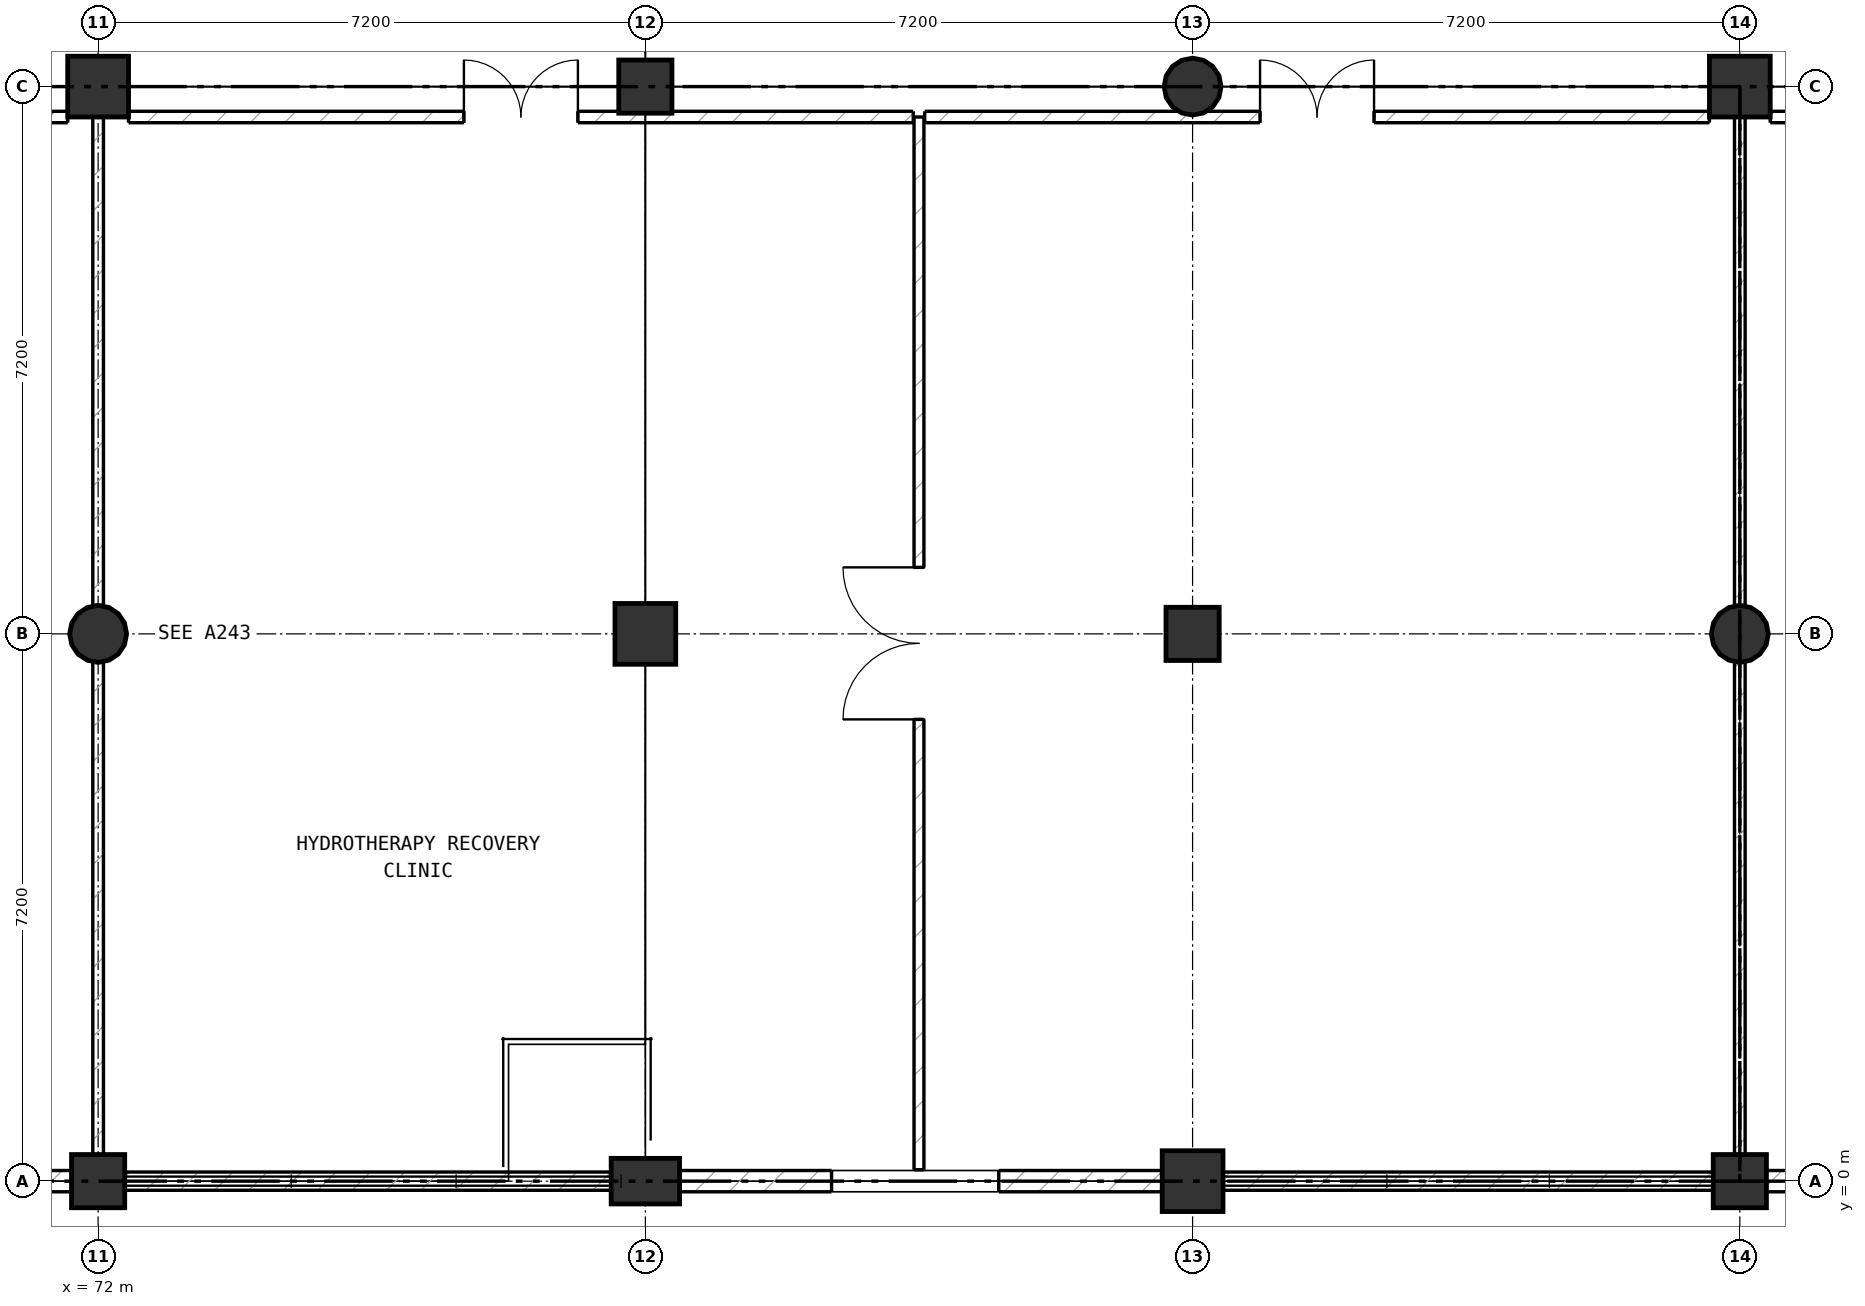
"""IFC4 building model, lengths in metres.
Left out: names, types, materials, properties, quantities, classifications, styles, units other than length and angle.
Written with IfcOpenShell. Run it as: python <this file> out.ifc"""

import sys

from ifc_helpers import new_model, si_unit, direction, frame, frame_2d, origin, origin_2d, place, context, subcontext, project, spatial, rectangle, circle, extrude, element, fill, save


model = new_model("IFC4")
c1 = context("Model", 3, precision=1e-05, world=origin(), true_north=direction((0.0, 1.0)))
c2 = subcontext(c1, "Body", "Model", "MODEL_VIEW")
j1 = project(units=[si_unit("LENGTHUNIT", "METRE"), si_unit("PLANEANGLEUNIT", "RADIAN")], contexts=[c1])
p1 = place(None, origin())
s1 = spatial("IfcSite", under=j1, at=p1, CompositionType="ELEMENT")
p2 = place(p1, origin())
s2 = spatial("IfcBuilding", under=s1, at=p2, CompositionType="ELEMENT")
p3 = place(p2, frame((0.0, 0.0, 5.6)))
s3 = spatial("IfcBuildingStorey", under=s2, at=p3, CompositionType="ELEMENT", Elevation=5.6)
p4 = place(p3, frame((72.0, 0.0, 0.0), z_axis=(0.0, 0.0, 1.0), x_axis=(1.0, 0.0, 0.0)))
e1 = element("IfcColumn", 1, at=p4, inside=s3, PredefinedType="COLUMN", context=c2, shape_type="SweptSolid", body=[
    extrude(rectangle(XDim=0.7, YDim=0.7, at=origin_2d()), origin(), (0.0, 0.0, 1.0), 5.6),
])
p5 = place(p3, frame((72.0, 7.2, 0.0), z_axis=(0.0, 0.0, 1.0), x_axis=(1.0, 0.0, 0.0)))
e2 = element("IfcColumn", 2, at=p5, inside=s3, PredefinedType="COLUMN", context=c2, shape_type="SweptSolid", body=[
    extrude(circle(Radius=0.375, at=origin_2d()), origin(), (0.0, 0.0, 1.0), 5.6),
])
p6 = place(p3, frame((72.0, 14.4, 0.0), z_axis=(0.0, 0.0, 1.0), x_axis=(1.0, 0.0, 0.0)))
e3 = element("IfcColumn", 3, at=p6, inside=s3, PredefinedType="COLUMN", context=c2, shape_type="SweptSolid", body=[
    extrude(rectangle(XDim=0.8, YDim=0.8, at=origin_2d()), origin(), (0.0, 0.0, 1.0), 5.6),
])
p7 = place(p3, frame((79.2, 0.0, 0.0), z_axis=(0.0, 0.0, 1.0), x_axis=(1.0, 0.0, 0.0)))
e4 = element("IfcColumn", 4, at=p7, inside=s3, PredefinedType="COLUMN", context=c2, shape_type="SweptSolid", body=[
    extrude(rectangle(XDim=0.6, YDim=0.9, at=origin_2d()), origin(), (0.0, 0.0, 1.0), 5.6),
])
p8 = place(p3, frame((79.2, 7.2, 0.0), z_axis=(0.0, 0.0, 1.0), x_axis=(1.0, 0.0, 0.0)))
e5 = element("IfcColumn", 5, at=p8, inside=s3, PredefinedType="COLUMN", context=c2, shape_type="SweptSolid", body=[
    extrude(rectangle(XDim=0.8, YDim=0.8, at=origin_2d()), origin(), (0.0, 0.0, 1.0), 5.6),
])
p9 = place(p3, frame((79.2, 14.4, 0.0), z_axis=(0.0, 0.0, 1.0), x_axis=(1.0, 0.0, 0.0)))
e6 = element("IfcColumn", 6, at=p9, inside=s3, PredefinedType="COLUMN", context=c2, shape_type="SweptSolid", body=[
    extrude(rectangle(XDim=0.7, YDim=0.7, at=origin_2d()), origin(), (0.0, 0.0, 1.0), 5.6),
])
p10 = place(p3, frame((86.4, 0.0, 0.0), z_axis=(0.0, 0.0, 1.0), x_axis=(1.0, 0.0, 0.0)))
e7 = element("IfcColumn", 7, at=p10, inside=s3, PredefinedType="COLUMN", context=c2, shape_type="SweptSolid", body=[
    extrude(rectangle(XDim=0.8, YDim=0.8, at=origin_2d()), origin(), (0.0, 0.0, 1.0), 5.6),
])
p11 = place(p3, frame((86.4, 7.2, 0.0), z_axis=(0.0, 0.0, 1.0), x_axis=(1.0, 0.0, 0.0)))
e8 = element("IfcColumn", 8, at=p11, inside=s3, PredefinedType="COLUMN", context=c2, shape_type="SweptSolid", body=[
    extrude(rectangle(XDim=0.7, YDim=0.7, at=origin_2d()), origin(), (0.0, 0.0, 1.0), 5.6),
])
p12 = place(p3, frame((86.4, 14.4, 0.0), z_axis=(0.0, 0.0, 1.0), x_axis=(1.0, 0.0, 0.0)))
e9 = element("IfcColumn", 9, at=p12, inside=s3, PredefinedType="COLUMN", context=c2, shape_type="SweptSolid", body=[
    extrude(circle(Radius=0.375, at=origin_2d()), origin(), (0.0, 0.0, 1.0), 5.6),
])
p13 = place(p3, frame((93.6, 0.0, 0.0), z_axis=(0.0, 0.0, 1.0), x_axis=(1.0, 0.0, 0.0)))
e10 = element("IfcColumn", 10, at=p13, inside=s3, PredefinedType="COLUMN", context=c2, shape_type="SweptSolid", body=[
    extrude(rectangle(XDim=0.7, YDim=0.7, at=origin_2d()), origin(), (0.0, 0.0, 1.0), 5.6),
])
p14 = place(p3, frame((93.6, 7.2, 0.0), z_axis=(0.0, 0.0, 1.0), x_axis=(1.0, 0.0, 0.0)))
e11 = element("IfcColumn", 11, at=p14, inside=s3, PredefinedType="COLUMN", context=c2, shape_type="SweptSolid", body=[
    extrude(circle(Radius=0.375, at=origin_2d()), origin(), (0.0, 0.0, 1.0), 5.6),
])
p15 = place(p3, frame((93.6, 14.4, 0.0), z_axis=(0.0, 0.0, 1.0), x_axis=(1.0, 0.0, 0.0)))
e12 = element("IfcColumn", 12, at=p15, inside=s3, PredefinedType="COLUMN", context=c2, shape_type="SweptSolid", body=[
    extrude(rectangle(XDim=0.8, YDim=0.8, at=origin_2d()), origin(), (0.0, 0.0, 1.0), 5.6),
])
p16 = place(p3, frame((100.515, 0.0, 0.0), z_axis=(0.0, 0.0, 1.0), x_axis=(-1.0, 0.0, 0.0)))
e13 = element("IfcWall", 13, at=p16, inside=s3, PredefinedType="SOLIDWALL", context=c2, shape_type="SweptSolid", body=[
    extrude(rectangle(XDim=6.58, YDim=0.28, at=frame_2d((3.29, 0.0))), origin(), (0.0, 0.0, 1.0), 4.985),
])
p17 = place(p16, frame((2.19, 0.0, 1.0)))
e14 = element("IfcOpeningElement", 14, at=p17, cuts=e13, PredefinedType="OPENING", context=c2, shape_type="SweptSolid", body=[
    extrude(rectangle(XDim=2.2, YDim=1.8, at=frame_2d((1.1, 0.9))), frame((0.0, 0.15, 0.0), z_axis=(0.0, -1.0, 0.0), x_axis=(1.0, 0.0, 0.0)), (0.0, 0.0, 1.0), 0.3),
])
p18 = place(p3, frame((93.265, 0.0, 0.0), z_axis=(0.0, 0.0, 1.0), x_axis=(-1.0, 0.0, 0.0)))
e15 = element("IfcWall", 15, at=p18, inside=s3, PredefinedType="SOLIDWALL", context=c2, shape_type="SweptSolid", body=[
    extrude(rectangle(XDim=6.48, YDim=0.24, at=frame_2d((3.24, 0.0))), origin(), (0.0, 0.0, 1.0), 0.35),
])
p19 = place(p3, frame((86.015, 0.0, 0.0), z_axis=(0.0, 0.0, 1.0), x_axis=(-1.0, 0.0, 0.0)))
e16 = element("IfcWall", 16, at=p19, inside=s3, PredefinedType="SOLIDWALL", context=c2, shape_type="SweptSolid", body=[
    extrude(rectangle(XDim=6.53, YDim=0.28, at=frame_2d((3.265, 0.0))), origin(), (0.0, 0.0, 1.0), 4.985),
])
p20 = place(p19, frame((2.165, 0.0, 1.0)))
e17 = element("IfcOpeningElement", 17, at=p20, cuts=e16, PredefinedType="OPENING", context=c2, shape_type="SweptSolid", body=[
    extrude(rectangle(XDim=2.2, YDim=1.8, at=frame_2d((1.1, 0.9))), frame((0.0, 0.15, 0.0), z_axis=(0.0, -1.0, 0.0), x_axis=(1.0, 0.0, 0.0)), (0.0, 0.0, 1.0), 0.3),
])
p21 = place(p3, frame((78.915, 0.0, 0.0), z_axis=(0.0, 0.0, 1.0), x_axis=(-1.0, 0.0, 0.0)))
e18 = element("IfcWall", 18, at=p21, inside=s3, PredefinedType="SOLIDWALL", context=c2, shape_type="SweptSolid", body=[
    extrude(rectangle(XDim=6.58, YDim=0.24, at=frame_2d((3.29, 0.0))), origin(), (0.0, 0.0, 1.0), 0.35),
])
p22 = place(p3, frame((71.665, 0.0, 0.0), z_axis=(0.0, 0.0, 1.0), x_axis=(-1.0, 0.0, 0.0)))
e19 = element("IfcWall", 19, at=p22, inside=s3, PredefinedType="SOLIDWALL", context=c2, shape_type="SweptSolid", body=[
    extrude(rectangle(XDim=6.48, YDim=0.28, at=frame_2d((3.24, 0.0))), origin(), (0.0, 0.0, 1.0), 4.985),
])
p23 = place(p22, frame((2.34, 0.0, 1.0)))
e20 = element("IfcOpeningElement", 20, at=p23, cuts=e19, PredefinedType="OPENING", context=c2, shape_type="SweptSolid", body=[
    extrude(rectangle(XDim=1.8, YDim=1.8, at=frame_2d((0.9, 0.9))), frame((0.0, 0.15, 0.0), z_axis=(0.0, -1.0, 0.0), x_axis=(1.0, 0.0, 0.0)), (0.0, 0.0, 1.0), 0.3),
])
p24 = place(p3, frame((72.0, 0.35, 0.0), z_axis=(0.0, 0.0, 1.0), x_axis=(0.0, 1.0, 0.0)))
e21 = element("IfcWall", 21, at=p24, inside=s3, PredefinedType="PARTITIONING", context=c2, shape_type="SweptSolid", body=[
    extrude(rectangle(XDim=6.475, YDim=0.14, at=frame_2d((3.237, 0.0))), origin(), (0.0, 0.0, 1.0), 4.88),
])
p25 = place(p3, frame((72.0, 7.575, 0.0), z_axis=(0.0, 0.0, 1.0), x_axis=(0.0, 1.0, 0.0)))
e22 = element("IfcWall", 22, at=p25, inside=s3, PredefinedType="PARTITIONING", context=c2, shape_type="SweptSolid", body=[
    extrude(rectangle(XDim=6.425, YDim=0.14, at=frame_2d((3.212, 0.0))), origin(), (0.0, 0.0, 1.0), 4.88),
])
p26 = place(p3, frame((93.6, 0.35, 0.0), z_axis=(0.0, 0.0, 1.0), x_axis=(0.0, 1.0, 0.0)))
e23 = element("IfcWall", 23, at=p26, inside=s3, PredefinedType="PARTITIONING", context=c2, shape_type="SweptSolid", body=[
    extrude(rectangle(XDim=6.475, YDim=0.14, at=frame_2d((3.237, 0.0))), origin(), (0.0, 0.0, 1.0), 4.88),
])
p27 = place(p3, frame((93.6, 7.575, 0.0), z_axis=(0.0, 0.0, 1.0), x_axis=(0.0, 1.0, 0.0)))
e24 = element("IfcWall", 24, at=p27, inside=s3, PredefinedType="PARTITIONING", context=c2, shape_type="SweptSolid", body=[
    extrude(rectangle(XDim=6.425, YDim=0.14, at=frame_2d((3.212, 0.0))), origin(), (0.0, 0.0, 1.0), 4.88),
])
p28 = place(p3, frame((82.8, 0.15, 0.0), z_axis=(0.0, 0.0, 1.0), x_axis=(0.0, 1.0, 0.0)))
e25 = element("IfcWall", 25, at=p28, inside=s3, PredefinedType="PARTITIONING", context=c2, shape_type="SweptSolid", body=[
    extrude(rectangle(XDim=13.85, YDim=0.13, at=frame_2d((6.925, 0.0))), origin(), (0.0, 0.0, 1.0), 5.31),
])
p29 = place(p28, frame((5.925, 0.0, 0.0)))
e26 = element("IfcOpeningElement", 26, at=p29, cuts=e25, PredefinedType="OPENING", context=c2, shape_type="SweptSolid", body=[
    extrude(rectangle(XDim=2.0, YDim=2.3, at=frame_2d((1.0, 1.15))), frame((0.0, 0.075, 0.0), z_axis=(0.0, -1.0, 0.0), x_axis=(1.0, 0.0, 0.0)), (0.0, 0.0, 1.0), 0.15),
])
p30 = place(p3, frame((64.86, 14.0, 0.0), z_axis=(0.0, 0.0, 1.0), x_axis=(1.0, 0.0, 0.0)))
e27 = element("IfcWall", 27, at=p30, inside=s3, PredefinedType="PARTITIONING", context=c2, shape_type="SweptSolid", body=[
    extrude(rectangle(XDim=6.74, YDim=0.15, at=frame_2d((3.37, 0.0))), origin(), (0.0, 0.0, 1.0), 5.31),
])
p31 = place(p30, frame((2.845, 0.0, 0.0)))
e28 = element("IfcOpeningElement", 28, at=p31, cuts=e27, PredefinedType="OPENING", context=c2, shape_type="SweptSolid", body=[
    extrude(rectangle(XDim=1.05, YDim=2.15, at=frame_2d((0.525, 1.075))), frame((0.0, 0.085, 0.0), z_axis=(0.0, -1.0, 0.0), x_axis=(1.0, 0.0, 0.0)), (0.0, 0.0, 1.0), 0.17),
])
p32 = place(p3, frame((72.4, 14.0, 0.0), z_axis=(0.0, 0.0, 1.0), x_axis=(1.0, 0.0, 0.0)))
e29 = element("IfcWall", 29, at=p32, inside=s3, PredefinedType="PARTITIONING", context=c2, shape_type="SweptSolid", body=[
    extrude(rectangle(XDim=10.325, YDim=0.15, at=frame_2d((5.163, 0.0))), origin(), (0.0, 0.0, 1.0), 5.31),
])
p33 = place(p32, frame((4.413, 0.0, 0.0)))
e30 = element("IfcOpeningElement", 30, at=p33, cuts=e29, PredefinedType="OPENING", context=c2, shape_type="SweptSolid", body=[
    extrude(rectangle(XDim=1.5, YDim=2.2, at=frame_2d((0.75, 1.1))), frame((0.0, 0.085, 0.0), z_axis=(0.0, -1.0, 0.0), x_axis=(1.0, 0.0, 0.0)), (0.0, 0.0, 1.0), 0.17),
])
p34 = place(p3, frame((82.875, 14.0, 0.0), z_axis=(0.0, 0.0, 1.0), x_axis=(1.0, 0.0, 0.0)))
e31 = element("IfcWall", 31, at=p34, inside=s3, PredefinedType="PARTITIONING", context=c2, shape_type="SweptSolid", body=[
    extrude(rectangle(XDim=10.325, YDim=0.15, at=frame_2d((5.163, 0.0))), origin(), (0.0, 0.0, 1.0), 5.31),
])
p35 = place(p34, frame((4.413, 0.0, 0.0)))
e32 = element("IfcOpeningElement", 32, at=p35, cuts=e31, PredefinedType="OPENING", context=c2, shape_type="SweptSolid", body=[
    extrude(rectangle(XDim=1.5, YDim=2.2, at=frame_2d((0.75, 1.1))), frame((0.0, 0.085, 0.0), z_axis=(0.0, -1.0, 0.0), x_axis=(1.0, 0.0, 0.0)), (0.0, 0.0, 1.0), 0.17),
])
p36 = place(p3, frame((94.0, 14.0, 0.0), z_axis=(0.0, 0.0, 1.0), x_axis=(1.0, 0.0, 0.0)))
e33 = element("IfcWall", 33, at=p36, inside=s3, PredefinedType="PARTITIONING", context=c2, shape_type="SweptSolid", body=[
    extrude(rectangle(XDim=6.72, YDim=0.15, at=frame_2d((3.36, 0.0))), origin(), (0.0, 0.0, 1.0), 5.31),
])
p37 = place(p36, frame((2.835, 0.0, 0.0)))
e34 = element("IfcOpeningElement", 34, at=p37, cuts=e33, PredefinedType="OPENING", context=c2, shape_type="SweptSolid", body=[
    extrude(rectangle(XDim=1.05, YDim=2.15, at=frame_2d((0.525, 1.075))), frame((0.0, 0.085, 0.0), z_axis=(0.0, -1.0, 0.0), x_axis=(1.0, 0.0, 0.0)), (0.0, 0.0, 1.0), 0.17),
])
p38 = place(p20, origin())
e35 = element("IfcWindow", 35, at=p38, inside=s3, PartitioningType="SINGLE_PANEL", PredefinedType="WINDOW", context=c2, shape_type="SweptSolid", body=[
    extrude(rectangle(XDim=2.2, YDim=1.8, at=frame_2d((1.1, 0.9))), frame((0.0, 0.03, 0.0), z_axis=(0.0, -1.0, 0.0), x_axis=(1.0, 0.0, 0.0)), (0.0, 0.0, 1.0), 0.06),
])
fill(e17, e35)
p39 = place(p29, origin())
e36 = element("IfcDoor", 36, at=p39, inside=s3, OperationType="DOUBLE_DOOR_SINGLE_SWING", PredefinedType="DOOR", context=c2, shape_type="SweptSolid", body=[
    extrude(rectangle(XDim=2.0, YDim=2.3, at=frame_2d((1.0, 1.15))), frame((0.0, 0.025, 0.0), z_axis=(0.0, -1.0, 0.0), x_axis=(1.0, 0.0, 0.0)), (0.0, 0.0, 1.0), 0.05),
])
fill(e26, e36)
p40 = place(p33, origin())
e37 = element("IfcDoor", 37, at=p40, inside=s3, OperationType="DOUBLE_DOOR_SINGLE_SWING", PredefinedType="DOOR", context=c2, shape_type="SweptSolid", body=[
    extrude(rectangle(XDim=1.5, YDim=2.2, at=frame_2d((0.75, 1.1))), frame((0.0, 0.025, 0.0), z_axis=(0.0, -1.0, 0.0), x_axis=(1.0, 0.0, 0.0)), (0.0, 0.0, 1.0), 0.05),
])
fill(e30, e37)
p41 = place(p35, origin())
e38 = element("IfcDoor", 38, at=p41, inside=s3, OperationType="DOUBLE_DOOR_SINGLE_SWING", PredefinedType="DOOR", context=c2, shape_type="SweptSolid", body=[
    extrude(rectangle(XDim=1.5, YDim=2.2, at=frame_2d((0.75, 1.1))), frame((0.0, 0.025, 0.0), z_axis=(0.0, -1.0, 0.0), x_axis=(1.0, 0.0, 0.0)), (0.0, 0.0, 1.0), 0.05),
])
fill(e32, e38)
save(model, sys.argv[1])
